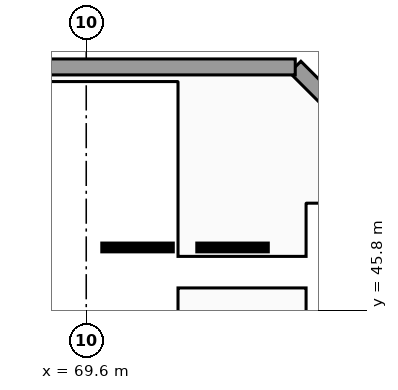
"""IFC4 building model, lengths in metres.
Left out: names, types, materials, properties, quantities, classifications, styles, units other than length and angle.
Written with IfcOpenShell. Run it as: python <this file> out.ifc"""

import sys

from ifc_helpers import new_model, si_unit, direction, frame, frame_2d, origin, place, context, subcontext, project, spatial, rectangle, extrude, element, save


model = new_model("IFC4")
c1 = context("Model", 3, precision=1e-05, world=origin(), true_north=direction((0.0, 1.0)))
c2 = subcontext(c1, "Body", "Model", "MODEL_VIEW")
j1 = project(units=[si_unit("LENGTHUNIT", "METRE"), si_unit("PLANEANGLEUNIT", "RADIAN")], contexts=[c1])
p1 = place(None, origin())
s1 = spatial("IfcSite", under=j1, at=p1, CompositionType="ELEMENT")
p2 = place(p1, origin())
s2 = spatial("IfcBuilding", under=s1, at=p2, CompositionType="ELEMENT")
p3 = place(p2, frame((0.0, 0.0, -8.16)))
s3 = spatial("IfcBuildingStorey", under=s2, at=p3, CompositionType="ELEMENT", Elevation=-8.16)
p4 = place(p3, frame((75.1, 52.2, 0.0), z_axis=(0.0, 0.0, 1.0), x_axis=(0.707106781187, -0.707106781187, 0.0)))
e1 = element("IfcWall", 1, at=p4, inside=s3, PredefinedType="SOLIDWALL", context=c2, shape_type="SweptSolid", body=[
    extrude(rectangle(XDim=5.94, YDim=0.42, at=frame_2d((2.97, 0.0))), origin(), (0.0, 0.0, 1.0), 3.76),
])
p5 = place(p3, frame((1.7, 52.2, 0.0), z_axis=(0.0, 0.0, 1.0), x_axis=(1.0, 0.0, 0.0)))
e2 = element("IfcWall", 2, at=p5, inside=s3, PredefinedType="SOLIDWALL", context=c2, shape_type="SweptSolid", body=[
    extrude(rectangle(XDim=73.4, YDim=0.42, at=frame_2d((36.7, 0.0))), origin(), (0.0, 0.0, 1.0), 3.76),
])
save(model, sys.argv[1])
